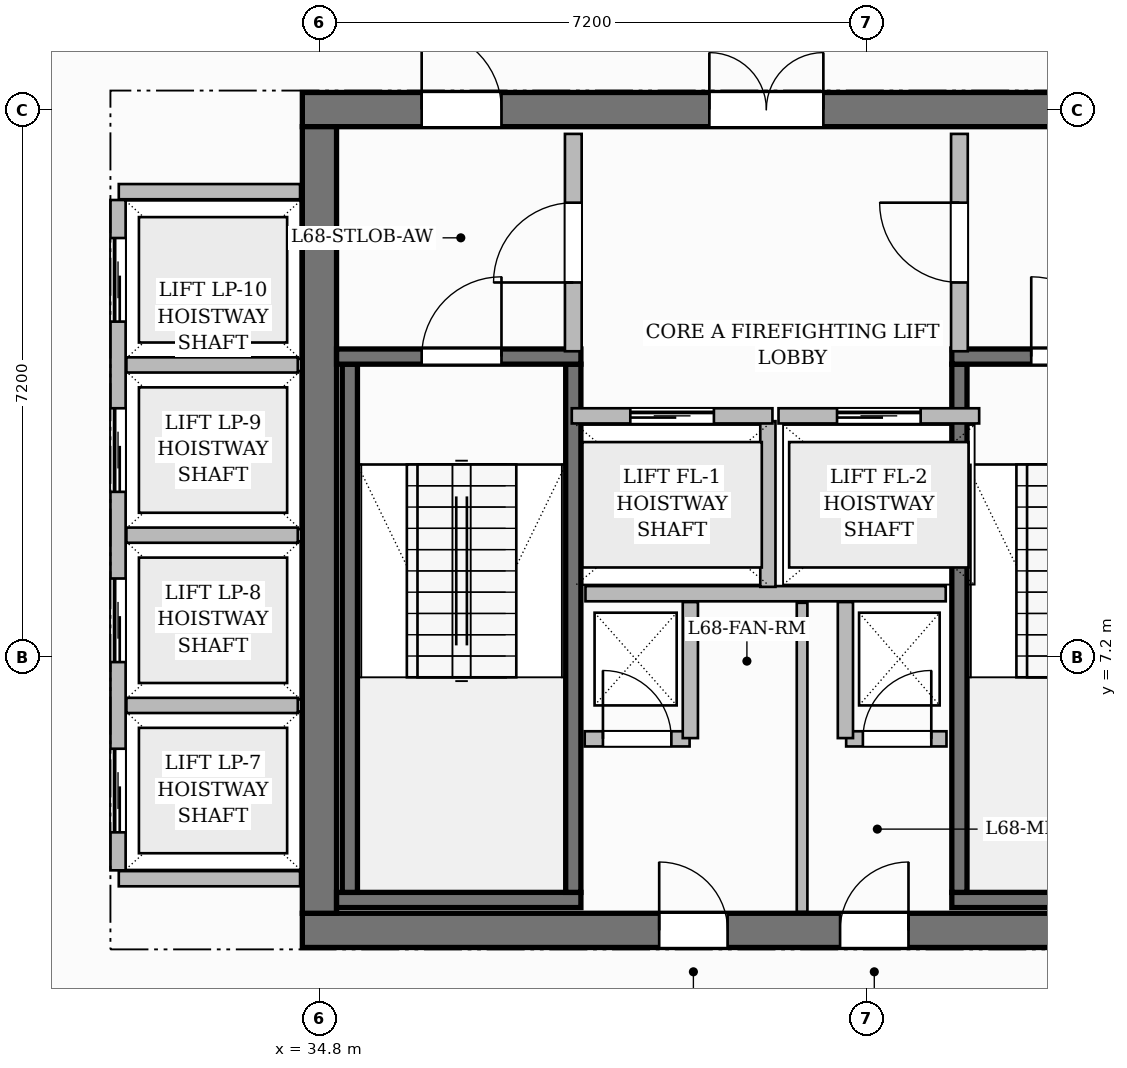
"""IFC4 building model, lengths in metres.
Left out: names, types, materials, properties, quantities, classifications, styles, units other than length and angle.
Written with IfcOpenShell. Run it as: python <this file> out.ifc"""

import sys

from ifc_helpers import new_model, si_unit, direction, frame, frame_2d, origin, place, context, subcontext, project, spatial, rectangle, extrude, source, transform, mapped, element, fill, save


model = new_model("IFC4")
c1 = context("Model", 3, precision=1e-05, world=origin(), true_north=direction((0.0, 1.0)))
c2 = subcontext(c1, "Body", "Model", "MODEL_VIEW")
j1 = project(units=[si_unit("LENGTHUNIT", "METRE"), si_unit("PLANEANGLEUNIT", "RADIAN")], contexts=[c1])
p1 = place(None, origin())
s1 = spatial("IfcSite", under=j1, at=p1, CompositionType="ELEMENT")
p2 = place(p1, origin())
s2 = spatial("IfcBuilding", under=s1, at=p2, CompositionType="ELEMENT")
p3 = place(p2, frame((0.0, 0.0, 271.2)))
s3 = spatial("IfcBuildingStorey", under=s2, at=p3, CompositionType="ELEMENT", Elevation=271.2)
p4 = place(p3, frame((34.575, 3.6, 0.0), z_axis=(0.0, 0.0, 1.0), x_axis=(1.0, 0.0, 0.0)))
e1 = element("IfcWall", 1, at=p4, inside=s3, PredefinedType="SHEAR", context=c2, shape_type="SweptSolid", body=[
    extrude(rectangle(XDim=15.45, YDim=0.45, at=frame_2d((7.725, 0.0))), origin(), (0.0, 0.0, 1.0), 3.85),
])
p5 = place(p4, frame((4.695, 0.0, 0.0)))
e2 = element("IfcOpeningElement", 2, at=p5, cuts=e1, PredefinedType="OPENING", context=c2, shape_type="SweptSolid", body=[
    extrude(rectangle(XDim=0.9, YDim=2.1, at=frame_2d((0.45, 1.05))), frame((0.0, 0.235, 0.0), z_axis=(0.0, -1.0, 0.0), x_axis=(1.0, 0.0, 0.0)), (0.0, 0.0, 1.0), 0.47),
])
p6 = place(p4, frame((7.075, 0.0, 0.0)))
e3 = element("IfcOpeningElement", 3, at=p6, cuts=e1, PredefinedType="OPENING", context=c2, shape_type="SweptSolid", body=[
    extrude(rectangle(XDim=0.9, YDim=2.1, at=frame_2d((0.45, 1.05))), frame((0.0, 0.235, 0.0), z_axis=(0.0, -1.0, 0.0), x_axis=(1.0, 0.0, 0.0)), (0.0, 0.0, 1.0), 0.47),
])
p7 = place(p3, frame((34.575, 14.4, 0.0), z_axis=(0.0, 0.0, 1.0), x_axis=(1.0, 0.0, 0.0)))
e4 = element("IfcWall", 4, at=p7, inside=s3, PredefinedType="SHEAR", context=c2, shape_type="SweptSolid", body=[
    extrude(rectangle(XDim=15.45, YDim=0.45, at=frame_2d((7.725, 0.0))), origin(), (0.0, 0.0, 1.0), 3.85),
])
p8 = place(p7, frame((5.355, 0.0, 0.0)))
e5 = element("IfcOpeningElement", 5, at=p8, cuts=e4, PredefinedType="OPENING", context=c2, shape_type="SweptSolid", body=[
    extrude(rectangle(XDim=1.5, YDim=2.2, at=frame_2d((0.75, 1.1))), frame((0.0, 0.235, 0.0), z_axis=(0.0, -1.0, 0.0), x_axis=(1.0, 0.0, 0.0)), (0.0, 0.0, 1.0), 0.47),
])
p9 = place(p7, frame((1.57, 0.0, 0.0)))
e6 = element("IfcOpeningElement", 6, at=p9, cuts=e4, PredefinedType="OPENING", context=c2, shape_type="SweptSolid", body=[
    extrude(rectangle(XDim=1.05, YDim=2.15, at=frame_2d((0.525, 1.075))), frame((0.0, 0.235, 0.0), z_axis=(0.0, -1.0, 0.0), x_axis=(1.0, 0.0, 0.0)), (0.0, 0.0, 1.0), 0.47),
])
p10 = place(p7, frame((11.2, 0.0, 0.0)))
e7 = element("IfcOpeningElement", 7, at=p10, cuts=e4, PredefinedType="OPENING", context=c2, shape_type="SweptSolid", body=[
    extrude(rectangle(XDim=1.05, YDim=2.15, at=frame_2d((0.525, 1.075))), frame((0.0, 0.235, 0.0), z_axis=(0.0, -1.0, 0.0), x_axis=(1.0, 0.0, 0.0)), (0.0, 0.0, 1.0), 0.47),
])
p11 = place(p3, frame((34.8, 3.825, 0.0), z_axis=(0.0, 0.0, 1.0), x_axis=(0.0, 1.0, 0.0)))
e8 = element("IfcWall", 8, at=p11, inside=s3, PredefinedType="SHEAR", context=c2, shape_type="SweptSolid", body=[
    extrude(rectangle(XDim=10.35, YDim=0.45, at=frame_2d((5.175, 0.0))), origin(), (0.0, 0.0, 1.0), 3.85),
])
p12 = place(p3, frame((35.025, 4.0, 0.0), z_axis=(0.0, 0.0, 1.0), x_axis=(1.0, 0.0, 0.0)))
e9 = element("IfcWall", 9, at=p12, inside=s3, PredefinedType="SHEAR", context=c2, shape_type="SweptSolid", body=[
    extrude(rectangle(XDim=3.215, YDim=0.2, at=frame_2d((1.607, 0.0))), origin(), (0.0, 0.0, 1.0), 3.85),
])
for number, where, z_axis, x_axis in (
    (10, (35.2, 4.1, 0.0), (0.0, 0.0, 1.0), (0.0, 1.0, 0.0)),
    (11, (38.14, 4.1, 0.0), (0.0, 0.0, 1.0), (0.0, 1.0, 0.0)),
):
    element("IfcWall", number, at=place(p3, frame(where, z_axis=z_axis, x_axis=x_axis)), inside=s3, PredefinedType="SHEAR", context=c2, shape_type="SweptSolid", body=[
        extrude(rectangle(XDim=6.95, YDim=0.2, at=frame_2d((3.475, 0.0))), origin(), (0.0, 0.0, 1.0), 3.85),
    ])
p13 = place(p3, frame((35.025, 11.15, 0.0), z_axis=(0.0, 0.0, 1.0), x_axis=(1.0, 0.0, 0.0)))
e12 = element("IfcWall", 12, at=p13, inside=s3, PredefinedType="SHEAR", context=c2, shape_type="SweptSolid", body=[
    extrude(rectangle(XDim=3.215, YDim=0.2, at=frame_2d((1.607, 0.0))), origin(), (0.0, 0.0, 1.0), 3.85),
])
p14 = place(p13, frame((1.12, 0.0, 0.0)))
e13 = element("IfcOpeningElement", 13, at=p14, cuts=e12, PredefinedType="OPENING", context=c2, shape_type="SweptSolid", body=[
    extrude(rectangle(XDim=1.05, YDim=2.2, at=frame_2d((0.525, 1.1))), frame((0.0, 0.11, 0.0), z_axis=(0.0, -1.0, 0.0), x_axis=(1.0, 0.0, 0.0)), (0.0, 0.0, 1.0), 0.22),
])
p15 = place(p3, frame((43.12, 4.0, 0.0), z_axis=(0.0, 0.0, 1.0), x_axis=(1.0, 0.0, 0.0)))
e14 = element("IfcWall", 14, at=p15, inside=s3, PredefinedType="SHEAR", context=c2, shape_type="SweptSolid", body=[
    extrude(rectangle(XDim=6.455, YDim=0.2, at=frame_2d((3.228, 0.0))), origin(), (0.0, 0.0, 1.0), 3.85),
])
p16 = place(p3, frame((43.22, 4.1, 0.0), z_axis=(0.0, 0.0, 1.0), x_axis=(0.0, 1.0, 0.0)))
e15 = element("IfcWall", 15, at=p16, inside=s3, PredefinedType="SHEAR", context=c2, shape_type="SweptSolid", body=[
    extrude(rectangle(XDim=6.95, YDim=0.2, at=frame_2d((3.475, 0.0))), origin(), (0.0, 0.0, 1.0), 3.85),
])
p17 = place(p3, frame((43.12, 11.15, 0.0), z_axis=(0.0, 0.0, 1.0), x_axis=(1.0, 0.0, 0.0)))
e16 = element("IfcWall", 16, at=p17, inside=s3, PredefinedType="SHEAR", context=c2, shape_type="SweptSolid", body=[
    extrude(rectangle(XDim=6.455, YDim=0.2, at=frame_2d((3.228, 0.0))), origin(), (0.0, 0.0, 1.0), 3.85),
])
p18 = place(p17, frame((1.045, 0.0, 0.0)))
e17 = element("IfcOpeningElement", 17, at=p18, cuts=e16, PredefinedType="OPENING", context=c2, shape_type="SweptSolid", body=[
    extrude(rectangle(XDim=1.05, YDim=2.2, at=frame_2d((0.525, 1.1))), frame((0.0, 0.11, 0.0), z_axis=(0.0, -1.0, 0.0), x_axis=(1.0, 0.0, 0.0)), (0.0, 0.0, 1.0), 0.22),
])
p19 = place(p17, frame((4.125, 0.0, 0.0)))
e18 = element("IfcOpeningElement", 18, at=p19, cuts=e16, PredefinedType="OPENING", context=c2, shape_type="SweptSolid", body=[
    extrude(rectangle(XDim=1.05, YDim=2.2, at=frame_2d((0.525, 1.1))), frame((0.0, 0.11, 0.0), z_axis=(0.0, -1.0, 0.0), x_axis=(1.0, 0.0, 0.0)), (0.0, 0.0, 1.0), 0.22),
])
p20 = place(p3, frame((38.3, 8.03, 0.0), z_axis=(0.0, 0.0, 1.0), x_axis=(1.0, 0.0, 0.0)))
e19 = element("IfcWall", 19, at=p20, inside=s3, PredefinedType="PARTITIONING", context=c2, shape_type="SweptSolid", body=[
    extrude(rectangle(XDim=4.74, YDim=0.2, at=frame_2d((2.37, 0.0))), origin(), (0.0, 0.0, 1.0), 3.6),
])
p21 = place(p3, frame((40.7, 8.12, 0.0), z_axis=(0.0, 0.0, 1.0), x_axis=(0.0, 1.0, 0.0)))
e20 = element("IfcWall", 20, at=p21, inside=s3, PredefinedType="PARTITIONING", context=c2, shape_type="SweptSolid", body=[
    extrude(rectangle(XDim=2.18, YDim=0.2, at=frame_2d((1.09, 0.0))), origin(), (0.0, 0.0, 1.0), 3.6),
])
p22 = place(p3, frame((38.14, 11.22, 0.0), z_axis=(0.0, 0.0, 1.0), x_axis=(0.0, 1.0, 0.0)))
e21 = element("IfcWall", 21, at=p22, inside=s3, PredefinedType="PARTITIONING", context=c2, shape_type="SweptSolid", body=[
    extrude(rectangle(XDim=2.86, YDim=0.22, at=frame_2d((1.43, 0.0))), origin(), (0.0, 0.0, 1.0), 3.6),
])
p23 = place(p22, frame((0.905, 0.0, 0.0)))
e22 = element("IfcOpeningElement", 22, at=p23, cuts=e21, PredefinedType="OPENING", context=c2, shape_type="SweptSolid", body=[
    extrude(rectangle(XDim=1.05, YDim=2.15, at=frame_2d((0.525, 1.075))), frame((0.0, 0.12, 0.0), z_axis=(0.0, -1.0, 0.0), x_axis=(1.0, 0.0, 0.0)), (0.0, 0.0, 1.0), 0.24),
])
p24 = place(p3, frame((43.22, 11.22, 0.0), z_axis=(0.0, 0.0, 1.0), x_axis=(0.0, 1.0, 0.0)))
e23 = element("IfcWall", 23, at=p24, inside=s3, PredefinedType="PARTITIONING", context=c2, shape_type="SweptSolid", body=[
    extrude(rectangle(XDim=2.86, YDim=0.22, at=frame_2d((1.43, 0.0))), origin(), (0.0, 0.0, 1.0), 3.6),
])
p25 = place(p24, frame((0.905, 0.0, 0.0)))
e24 = element("IfcOpeningElement", 24, at=p25, cuts=e23, PredefinedType="OPENING", context=c2, shape_type="SweptSolid", body=[
    extrude(rectangle(XDim=1.05, YDim=2.15, at=frame_2d((0.525, 1.075))), frame((0.0, 0.12, 0.0), z_axis=(0.0, -1.0, 0.0), x_axis=(1.0, 0.0, 0.0)), (0.0, 0.0, 1.0), 0.24),
])
p26 = place(p3, frame((38.29, 6.12, 0.0), z_axis=(0.0, 0.0, 1.0), x_axis=(1.0, 0.0, 0.0)))
e25 = element("IfcWall", 25, at=p26, inside=s3, PredefinedType="PARTITIONING", context=c2, shape_type="SweptSolid", body=[
    extrude(rectangle(XDim=1.38, YDim=0.2, at=frame_2d((0.69, 0.0))), origin(), (0.0, 0.0, 1.0), 3.6),
])
p27 = place(p26, frame((0.24, 0.0, 0.0)))
e26 = element("IfcOpeningElement", 26, at=p27, cuts=e25, PredefinedType="OPENING", context=c2, shape_type="SweptSolid", body=[
    extrude(rectangle(XDim=0.9, YDim=2.1, at=frame_2d((0.45, 1.05))), frame((0.0, 0.11, 0.0), z_axis=(0.0, -1.0, 0.0), x_axis=(1.0, 0.0, 0.0)), (0.0, 0.0, 1.0), 0.22),
])
p28 = place(p3, frame((39.68, 6.13, 0.0), z_axis=(0.0, 0.0, 1.0), x_axis=(0.0, 1.0, 0.0)))
e27 = element("IfcWall", 27, at=p28, inside=s3, PredefinedType="PARTITIONING", context=c2, shape_type="SweptSolid", body=[
    extrude(rectangle(XDim=1.79, YDim=0.2, at=frame_2d((0.895, 0.0))), origin(), (0.0, 0.0, 1.0), 3.6),
])
p29 = place(p3, frame((41.73, 6.12, 0.0), z_axis=(0.0, 0.0, 1.0), x_axis=(1.0, 0.0, 0.0)))
e28 = element("IfcWall", 28, at=p29, inside=s3, PredefinedType="PARTITIONING", context=c2, shape_type="SweptSolid", body=[
    extrude(rectangle(XDim=1.32, YDim=0.2, at=frame_2d((0.66, 0.0))), origin(), (0.0, 0.0, 1.0), 3.6),
])
p30 = place(p29, frame((0.22, 0.0, 0.0)))
e29 = element("IfcOpeningElement", 29, at=p30, cuts=e28, PredefinedType="OPENING", context=c2, shape_type="SweptSolid", body=[
    extrude(rectangle(XDim=0.9, YDim=2.1, at=frame_2d((0.45, 1.05))), frame((0.0, 0.11, 0.0), z_axis=(0.0, -1.0, 0.0), x_axis=(1.0, 0.0, 0.0)), (0.0, 0.0, 1.0), 0.22),
])
p31 = place(p3, frame((41.72, 6.13, 0.0), z_axis=(0.0, 0.0, 1.0), x_axis=(0.0, 1.0, 0.0)))
e30 = element("IfcWall", 30, at=p31, inside=s3, PredefinedType="PARTITIONING", context=c2, shape_type="SweptSolid", body=[
    extrude(rectangle(XDim=1.79, YDim=0.2, at=frame_2d((0.895, 0.0))), origin(), (0.0, 0.0, 1.0), 3.6),
])
p32 = place(p3, frame((41.15, 3.845, 0.0), z_axis=(0.0, 0.0, 1.0), x_axis=(0.0, 1.0, 0.0)))
e31 = element("IfcWall", 31, at=p32, inside=s3, PredefinedType="PARTITIONING", context=c2, shape_type="SweptSolid", body=[
    extrude(rectangle(XDim=4.065, YDim=0.14, at=frame_2d((2.032, 0.0))), origin(), (0.0, 0.0, 1.0), 3.6),
])
for number, where, z_axis, x_axis in (
    (32, (32.16, 4.28, 0.0), (0.0, 0.0, 1.0), (1.0, 0.0, 0.0)),
    (33, (32.16, 13.32, 0.0), (0.0, 0.0, 1.0), (1.0, 0.0, 0.0)),
):
    element("IfcWall", number, at=place(p3, frame(where, z_axis=z_axis, x_axis=x_axis)), inside=s3, PredefinedType="PARTITIONING", context=c2, shape_type="SweptSolid", body=[
        extrude(rectangle(XDim=2.385, YDim=0.2, at=frame_2d((1.192, 0.0))), origin(), (0.0, 0.0, 1.0), 3.6),
    ])
p33 = place(p3, frame((32.15, 4.39, 0.0), z_axis=(0.0, 0.0, 1.0), x_axis=(0.0, 1.0, 0.0)))
e34 = element("IfcWall", 34, at=p33, inside=s3, PredefinedType="PARTITIONING", context=c2, shape_type="SweptSolid", body=[
    extrude(rectangle(XDim=8.82, YDim=0.2, at=frame_2d((4.41, 0.0))), origin(), (0.0, 0.0, 1.0), 3.6),
])
p34 = place(p33, frame((0.5, 0.0, 0.0)))
e35 = element("IfcOpeningElement", 35, at=p34, cuts=e34, PredefinedType="OPENING", context=c2, shape_type="SweptSolid", body=[
    extrude(rectangle(XDim=1.1, YDim=2.2, at=frame_2d((0.55, 1.1))), frame((0.0, 0.11, 0.0), z_axis=(0.0, -1.0, 0.0), x_axis=(1.0, 0.0, 0.0)), (0.0, 0.0, 1.0), 0.22),
])
p35 = place(p33, frame((2.74, 0.0, 0.0)))
e36 = element("IfcOpeningElement", 36, at=p35, cuts=e34, PredefinedType="OPENING", context=c2, shape_type="SweptSolid", body=[
    extrude(rectangle(XDim=1.1, YDim=2.2, at=frame_2d((0.55, 1.1))), frame((0.0, 0.11, 0.0), z_axis=(0.0, -1.0, 0.0), x_axis=(1.0, 0.0, 0.0)), (0.0, 0.0, 1.0), 0.22),
])
p36 = place(p33, frame((4.98, 0.0, 0.0)))
e37 = element("IfcOpeningElement", 37, at=p36, cuts=e34, PredefinedType="OPENING", context=c2, shape_type="SweptSolid", body=[
    extrude(rectangle(XDim=1.1, YDim=2.2, at=frame_2d((0.55, 1.1))), frame((0.0, 0.11, 0.0), z_axis=(0.0, -1.0, 0.0), x_axis=(1.0, 0.0, 0.0)), (0.0, 0.0, 1.0), 0.22),
])
p37 = place(p33, frame((7.22, 0.0, 0.0)))
e38 = element("IfcOpeningElement", 38, at=p37, cuts=e34, PredefinedType="OPENING", context=c2, shape_type="SweptSolid", body=[
    extrude(rectangle(XDim=1.1, YDim=2.2, at=frame_2d((0.55, 1.1))), frame((0.0, 0.11, 0.0), z_axis=(0.0, -1.0, 0.0), x_axis=(1.0, 0.0, 0.0)), (0.0, 0.0, 1.0), 0.22),
])
for number, where, z_axis, x_axis in (
    (39, (32.26, 6.56, 0.0), (0.0, 0.0, 1.0), (1.0, 0.0, 0.0)),
    (40, (32.26, 8.8, 0.0), (0.0, 0.0, 1.0), (1.0, 0.0, 0.0)),
    (41, (32.26, 11.04, 0.0), (0.0, 0.0, 1.0), (1.0, 0.0, 0.0)),
):
    element("IfcWall", number, at=place(p3, frame(where, z_axis=z_axis, x_axis=x_axis)), inside=s3, PredefinedType="PARTITIONING", context=c2, shape_type="SweptSolid", body=[
        extrude(rectangle(XDim=2.255, YDim=0.2, at=frame_2d((1.127, 0.0))), origin(), (0.0, 0.0, 1.0), 3.6),
    ])
p38 = place(p3, frame((38.12, 10.37, 0.0), z_axis=(0.0, 0.0, 1.0), x_axis=(1.0, 0.0, 0.0)))
e42 = element("IfcWall", 42, at=p38, inside=s3, PredefinedType="PARTITIONING", context=c2, shape_type="SweptSolid", body=[
    extrude(rectangle(XDim=2.64, YDim=0.2, at=frame_2d((1.32, 0.0))), origin(), (0.0, 0.0, 1.0), 3.6),
])
p39 = place(p38, frame((0.77, 0.0, 0.0)))
e43 = element("IfcOpeningElement", 43, at=p39, cuts=e42, PredefinedType="OPENING", context=c2, shape_type="SweptSolid", body=[
    extrude(rectangle(XDim=1.1, YDim=2.2, at=frame_2d((0.55, 1.1))), frame((0.0, 0.11, 0.0), z_axis=(0.0, -1.0, 0.0), x_axis=(1.0, 0.0, 0.0)), (0.0, 0.0, 1.0), 0.22),
])
p40 = place(p3, frame((40.84, 10.37, 0.0), z_axis=(0.0, 0.0, 1.0), x_axis=(1.0, 0.0, 0.0)))
e44 = element("IfcWall", 44, at=p40, inside=s3, PredefinedType="PARTITIONING", context=c2, shape_type="SweptSolid", body=[
    extrude(rectangle(XDim=2.64, YDim=0.2, at=frame_2d((1.32, 0.0))), origin(), (0.0, 0.0, 1.0), 3.6),
])
p41 = place(p40, frame((0.77, 0.0, 0.0)))
e45 = element("IfcOpeningElement", 45, at=p41, cuts=e44, PredefinedType="OPENING", context=c2, shape_type="SweptSolid", body=[
    extrude(rectangle(XDim=1.1, YDim=2.2, at=frame_2d((0.55, 1.1))), frame((0.0, 0.11, 0.0), z_axis=(0.0, -1.0, 0.0), x_axis=(1.0, 0.0, 0.0)), (0.0, 0.0, 1.0), 0.22),
])
m1 = source(origin(), c2, "Body", "SweptSolid", [
    extrude(rectangle(XDim=1.05, YDim=2.2, at=frame_2d((0.525, 1.1))), frame((0.0, 0.025, 0.0), z_axis=(0.0, -1.0, 0.0), x_axis=(1.0, 0.0, 0.0)), (0.0, 0.0, 1.0), 0.05),
])
p42 = place(p14, origin())
e46 = element("IfcDoor", 46, at=p42, inside=s3, OperationType="SINGLE_SWING_RIGHT", PredefinedType="DOOR", context=c2, shape_type="MappedRepresentation", body=[
    mapped(m1, transform((0.0, 0.0, 0.0), scale=1.0)),
])
fill(e13, e46)
p43 = place(p18, origin())
e47 = element("IfcDoor", 47, at=p43, inside=s3, OperationType="SINGLE_SWING_LEFT", PredefinedType="DOOR", context=c2, shape_type="MappedRepresentation", body=[
    mapped(m1, transform((0.0, 0.0, 0.0), scale=1.0)),
])
fill(e17, e47)
m2 = source(origin(), c2, "Body", "SweptSolid", [
    extrude(rectangle(XDim=1.05, YDim=2.15, at=frame_2d((0.525, 1.075))), frame((0.0, 0.025, 0.0), z_axis=(0.0, -1.0, 0.0), x_axis=(1.0, 0.0, 0.0)), (0.0, 0.0, 1.0), 0.05),
])
p44 = place(p23, origin())
e48 = element("IfcDoor", 48, at=p44, inside=s3, OperationType="SINGLE_SWING_LEFT", PredefinedType="DOOR", context=c2, shape_type="MappedRepresentation", body=[
    mapped(m2, transform((0.0, 0.0, 0.0), scale=1.0)),
])
fill(e22, e48)
p45 = place(p25, origin())
e49 = element("IfcDoor", 49, at=p45, inside=s3, OperationType="SINGLE_SWING_RIGHT", PredefinedType="DOOR", context=c2, shape_type="MappedRepresentation", body=[
    mapped(m2, transform((0.0, 0.0, 0.0), scale=1.0)),
])
fill(e24, e49)
m3 = source(origin(), c2, "Body", "SweptSolid", [
    extrude(rectangle(XDim=1.5, YDim=2.2, at=frame_2d((0.75, 1.1))), frame((0.0, 0.025, 0.0), z_axis=(0.0, -1.0, 0.0), x_axis=(1.0, 0.0, 0.0)), (0.0, 0.0, 1.0), 0.05),
])
p46 = place(p8, origin())
e50 = element("IfcDoor", 50, at=p46, inside=s3, OperationType="DOUBLE_DOOR_SINGLE_SWING", PredefinedType="DOOR", context=c2, shape_type="MappedRepresentation", body=[
    mapped(m3, transform((0.0, 0.0, 0.0), scale=1.0)),
])
fill(e5, e50)
p47 = place(p9, origin())
e51 = element("IfcDoor", 51, at=p47, inside=s3, OperationType="SINGLE_SWING_LEFT", PredefinedType="DOOR", context=c2, shape_type="MappedRepresentation", body=[
    mapped(m2, transform((0.0, 0.0, 0.0), scale=1.0)),
])
fill(e6, e51)
m4 = source(origin(), c2, "Body", "SweptSolid", [
    extrude(rectangle(XDim=0.9, YDim=2.1, at=frame_2d((0.45, 1.05))), frame((0.0, 0.025, 0.0), z_axis=(0.0, -1.0, 0.0), x_axis=(1.0, 0.0, 0.0)), (0.0, 0.0, 1.0), 0.05),
])
p48 = place(p27, origin())
e52 = element("IfcDoor", 52, at=p48, inside=s3, OperationType="SINGLE_SWING_LEFT", PredefinedType="DOOR", context=c2, shape_type="MappedRepresentation", body=[
    mapped(m4, transform((0.0, 0.0, 0.0), scale=1.0)),
])
fill(e26, e52)
p49 = place(p30, origin())
e53 = element("IfcDoor", 53, at=p49, inside=s3, OperationType="SINGLE_SWING_RIGHT", PredefinedType="DOOR", context=c2, shape_type="MappedRepresentation", body=[
    mapped(m4, transform((0.0, 0.0, 0.0), scale=1.0)),
])
fill(e29, e53)
p50 = place(p5, origin())
e54 = element("IfcDoor", 54, at=p50, inside=s3, OperationType="SINGLE_SWING_LEFT", PredefinedType="DOOR", context=c2, shape_type="MappedRepresentation", body=[
    mapped(m4, transform((0.0, 0.0, 0.0), scale=1.0)),
])
fill(e2, e54)
p51 = place(p6, origin())
e55 = element("IfcDoor", 55, at=p51, inside=s3, OperationType="SINGLE_SWING_RIGHT", PredefinedType="DOOR", context=c2, shape_type="MappedRepresentation", body=[
    mapped(m4, transform((0.0, 0.0, 0.0), scale=1.0)),
])
fill(e3, e55)
m5 = source(origin(), c2, "Body", "SweptSolid", [
    extrude(rectangle(XDim=1.1, YDim=2.2, at=frame_2d((0.55, 1.1))), frame((0.0, 0.025, 0.0), z_axis=(0.0, -1.0, 0.0), x_axis=(1.0, 0.0, 0.0)), (0.0, 0.0, 1.0), 0.05),
])
p52 = place(p39, origin())
e56 = element("IfcDoor", 56, at=p52, inside=s3, OperationType="SLIDING_TO_LEFT", PredefinedType="DOOR", context=c2, shape_type="MappedRepresentation", body=[
    mapped(m5, transform((0.0, 0.0, 0.0), scale=1.0)),
])
fill(e43, e56)
p53 = place(p41, origin())
e57 = element("IfcDoor", 57, at=p53, inside=s3, OperationType="SLIDING_TO_LEFT", PredefinedType="DOOR", context=c2, shape_type="MappedRepresentation", body=[
    mapped(m5, transform((0.0, 0.0, 0.0), scale=1.0)),
])
fill(e45, e57)
p54 = place(p34, origin())
e58 = element("IfcDoor", 58, at=p54, inside=s3, OperationType="SLIDING_TO_LEFT", PredefinedType="DOOR", context=c2, shape_type="MappedRepresentation", body=[
    mapped(m5, transform((0.0, 0.0, 0.0), scale=1.0)),
])
fill(e35, e58)
p55 = place(p35, origin())
e59 = element("IfcDoor", 59, at=p55, inside=s3, OperationType="SLIDING_TO_LEFT", PredefinedType="DOOR", context=c2, shape_type="MappedRepresentation", body=[
    mapped(m5, transform((0.0, 0.0, 0.0), scale=1.0)),
])
fill(e36, e59)
p56 = place(p36, origin())
e60 = element("IfcDoor", 60, at=p56, inside=s3, OperationType="SLIDING_TO_LEFT", PredefinedType="DOOR", context=c2, shape_type="MappedRepresentation", body=[
    mapped(m5, transform((0.0, 0.0, 0.0), scale=1.0)),
])
fill(e37, e60)
p57 = place(p37, origin())
e61 = element("IfcDoor", 61, at=p57, inside=s3, OperationType="SLIDING_TO_LEFT", PredefinedType="DOOR", context=c2, shape_type="MappedRepresentation", body=[
    mapped(m5, transform((0.0, 0.0, 0.0), scale=1.0)),
])
fill(e38, e61)
save(model, sys.argv[1])
